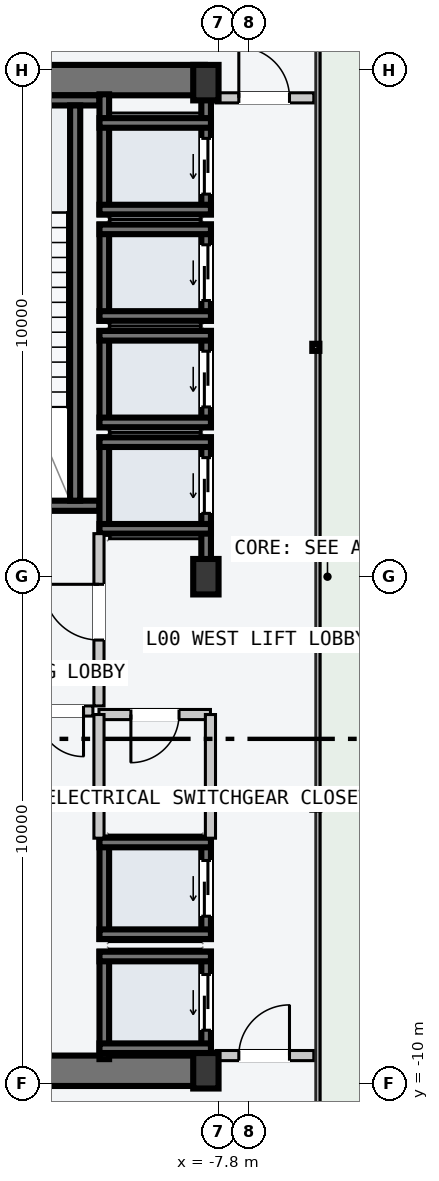
"""IFC4 building model, lengths in metres.
Left out: names, types, materials, properties, quantities, classifications, styles, units other than length and angle.
Written with IfcOpenShell. Run it as: python <this file> out.ifc"""

import sys

from ifc_helpers import new_model, si_unit, direction, frame, frame_2d, origin, origin_2d, place, context, subcontext, project, spatial, rectangle, i_section, extrude, element, fill, save


model = new_model("IFC4")
c1 = context("Model", 3, precision=1e-05, world=origin(), true_north=direction((0.0, 1.0)))
c2 = subcontext(c1, "Body", "Model", "MODEL_VIEW")
j1 = project(units=[si_unit("LENGTHUNIT", "METRE"), si_unit("PLANEANGLEUNIT", "RADIAN")], contexts=[c1])
p1 = place(None, origin())
s1 = spatial("IfcSite", under=j1, at=p1, CompositionType="ELEMENT")
p2 = place(p1, origin())
s2 = spatial("IfcBuilding", under=s1, at=p2, CompositionType="ELEMENT")
p3 = place(p2, origin())
s3 = spatial("IfcBuildingStorey", under=s2, at=p3, CompositionType="ELEMENT", Elevation=0.0)
for number, where, z_axis, x_axis in (
    (1, (-14.53, -9.75, -0.22), (0.0, 0.0, 1.0), (1.0, 0.0, 0.0)),
    (2, (-14.53, 9.8, -0.22), (0.0, 0.0, 1.0), (1.0, 0.0, 0.0)),
):
    element("IfcWall", number, at=place(p3, frame(where, z_axis=z_axis, x_axis=x_axis)), inside=s3, PredefinedType="SHEAR", context=c2, shape_type="SweptSolid", body=[
        extrude(rectangle(XDim=6.46, YDim=0.6, at=frame_2d((3.23, 0.0))), origin(), (0.0, 0.0, 1.0), 4.8),
    ])
p4 = place(p3, frame((-10.15, 1.4, -0.22), z_axis=(0.0, 0.0, 1.0), x_axis=(-1.0, 0.0, 0.0)))
e3 = element("IfcWall", 3, at=p4, inside=s3, PredefinedType="SOLIDWALL", context=c2, shape_type="SweptSolid", body=[
    extrude(rectangle(XDim=4.1, YDim=0.2, at=frame_2d((2.05, 0.0))), origin(), (0.0, 0.0, 1.0), 4.8),
])
p5 = place(p4, frame((1.5, 0.0, 0.22)))
e4 = element("IfcOpeningElement", 4, at=p5, cuts=e3, PredefinedType="OPENING", context=c2, shape_type="SweptSolid", body=[
    extrude(rectangle(XDim=1.12, YDim=2.18, at=frame_2d((0.56, 1.09))), frame((0.0, 0.11, 0.0), z_axis=(0.0, -1.0, 0.0), x_axis=(1.0, 0.0, 0.0)), (0.0, 0.0, 1.0), 0.22),
])
p6 = place(p3, frame((-14.25, 9.4, -0.22), z_axis=(0.0, 0.0, 1.0), x_axis=(1.0, 0.0, 0.0)))
e5 = element("IfcWall", 5, at=p6, inside=s3, PredefinedType="SOLIDWALL", context=c2, shape_type="SweptSolid", body=[
    extrude(rectangle(XDim=4.1, YDim=0.2, at=frame_2d((2.05, 0.0))), origin(), (0.0, 0.0, 1.0), 4.8),
])
p7 = place(p3, frame((-10.63, 1.5, -0.22), z_axis=(0.0, 0.0, 1.0), x_axis=(0.0, 1.0, 0.0)))
e6 = element("IfcWall", 6, at=p7, inside=s3, PredefinedType="SOLIDWALL", context=c2, shape_type="SweptSolid", body=[
    extrude(rectangle(XDim=7.8, YDim=0.2, at=frame_2d((3.9, 0.0))), origin(), (0.0, 0.0, 1.0), 4.8),
])
for number, where, z_axis, x_axis in (
    (7, (-8.05, -9.75, 0.0), (0.0, 0.0, 1.0), (1.0, 0.0, 0.0)),
    (8, (-8.05, 0.0, 0.0), (0.0, 0.0, 1.0), (1.0, 0.0, 0.0)),
    (9, (-8.05, 9.75, 0.0), (0.0, 0.0, 1.0), (1.0, 0.0, 0.0)),
):
    element("IfcColumn", number, at=place(p3, frame(where, z_axis=z_axis, x_axis=x_axis)), inside=s3, PredefinedType="COLUMN", context=c2, shape_type="SweptSolid", body=[
        extrude(i_section(OverallWidth=0.5, OverallDepth=0.7, WebThickness=0.028, FlangeThickness=0.045, at=origin_2d()), origin(), (0.0, 0.0, 1.0), 4.8),
    ])
p8 = place(p3, frame((-8.045, 0.21, -0.22), z_axis=(0.0, 0.0, 1.0), x_axis=(0.0, 1.0, 0.0)))
e10 = element("IfcWall", 10, at=p8, inside=s3, PredefinedType="SOLIDWALL", context=c2, shape_type="SweptSolid", body=[
    extrude(rectangle(XDim=2.54, YDim=0.19, at=frame_2d((1.27, 0.0))), origin(), (0.0, 0.0, 1.0), 4.8),
])
p9 = place(p8, frame((1.04, 0.0, 0.22)))
e11 = element("IfcOpeningElement", 11, at=p9, cuts=e10, PredefinedType="OPENING", context=c2, shape_type="SweptSolid", body=[
    extrude(rectangle(XDim=1.1, YDim=2.2, at=frame_2d((0.55, 1.1))), frame((0.0, 0.105, 0.0), z_axis=(0.0, -1.0, 0.0), x_axis=(1.0, 0.0, 0.0)), (0.0, 0.0, 1.0), 0.21),
])
p10 = place(p3, frame((-10.055, 0.85, -0.22), z_axis=(0.0, 0.0, 1.0), x_axis=(0.0, 1.0, 0.0)))
e12 = element("IfcWall", 12, at=p10, inside=s3, PredefinedType="SOLIDWALL", context=c2, shape_type="SweptSolid", body=[
    extrude(rectangle(XDim=1.9, YDim=0.19, at=frame_2d((0.95, 0.0))), origin(), (0.0, 0.0, 1.0), 4.8),
])
for number, where, z_axis, x_axis in (
    (13, (-10.15, 2.655, -0.22), (0.0, 0.0, 1.0), (1.0, 0.0, 0.0)),
    (14, (-10.15, 0.945, -0.22), (0.0, 0.0, 1.0), (1.0, 0.0, 0.0)),
):
    element("IfcWall", number, at=place(p3, frame(where, z_axis=z_axis, x_axis=x_axis)), inside=s3, PredefinedType="SOLIDWALL", context=c2, shape_type="SweptSolid", body=[
        extrude(rectangle(XDim=2.2, YDim=0.19, at=frame_2d((1.1, 0.0))), origin(), (0.0, 0.0, 1.0), 4.8),
    ])
p11 = place(p3, frame((-8.045, 2.95, -0.22), z_axis=(0.0, 0.0, 1.0), x_axis=(0.0, 1.0, 0.0)))
e15 = element("IfcWall", 15, at=p11, inside=s3, PredefinedType="SOLIDWALL", context=c2, shape_type="SweptSolid", body=[
    extrude(rectangle(XDim=1.9, YDim=0.19, at=frame_2d((0.95, 0.0))), origin(), (0.0, 0.0, 1.0), 4.8),
])
p12 = place(p11, frame((0.4, 0.0, 0.22)))
e16 = element("IfcOpeningElement", 16, at=p12, cuts=e15, PredefinedType="OPENING", context=c2, shape_type="SweptSolid", body=[
    extrude(rectangle(XDim=1.1, YDim=2.2, at=frame_2d((0.55, 1.1))), frame((0.0, 0.105, 0.0), z_axis=(0.0, -1.0, 0.0), x_axis=(1.0, 0.0, 0.0)), (0.0, 0.0, 1.0), 0.21),
])
p13 = place(p3, frame((-10.055, 2.95, -0.22), z_axis=(0.0, 0.0, 1.0), x_axis=(0.0, 1.0, 0.0)))
e17 = element("IfcWall", 17, at=p13, inside=s3, PredefinedType="SOLIDWALL", context=c2, shape_type="SweptSolid", body=[
    extrude(rectangle(XDim=1.9, YDim=0.19, at=frame_2d((0.95, 0.0))), origin(), (0.0, 0.0, 1.0), 4.8),
])
for number, where, z_axis, x_axis in (
    (18, (-10.15, 4.755, -0.22), (0.0, 0.0, 1.0), (1.0, 0.0, 0.0)),
    (19, (-10.15, 3.045, -0.22), (0.0, 0.0, 1.0), (1.0, 0.0, 0.0)),
):
    element("IfcWall", number, at=place(p3, frame(where, z_axis=z_axis, x_axis=x_axis)), inside=s3, PredefinedType="SOLIDWALL", context=c2, shape_type="SweptSolid", body=[
        extrude(rectangle(XDim=2.2, YDim=0.19, at=frame_2d((1.1, 0.0))), origin(), (0.0, 0.0, 1.0), 4.8),
    ])
p14 = place(p3, frame((-8.045, 5.05, -0.22), z_axis=(0.0, 0.0, 1.0), x_axis=(0.0, 1.0, 0.0)))
e20 = element("IfcWall", 20, at=p14, inside=s3, PredefinedType="SOLIDWALL", context=c2, shape_type="SweptSolid", body=[
    extrude(rectangle(XDim=1.9, YDim=0.19, at=frame_2d((0.95, 0.0))), origin(), (0.0, 0.0, 1.0), 4.8),
])
p15 = place(p14, frame((0.4, 0.0, 0.22)))
e21 = element("IfcOpeningElement", 21, at=p15, cuts=e20, PredefinedType="OPENING", context=c2, shape_type="SweptSolid", body=[
    extrude(rectangle(XDim=1.1, YDim=2.2, at=frame_2d((0.55, 1.1))), frame((0.0, 0.105, 0.0), z_axis=(0.0, -1.0, 0.0), x_axis=(1.0, 0.0, 0.0)), (0.0, 0.0, 1.0), 0.21),
])
p16 = place(p3, frame((-10.055, 5.05, -0.22), z_axis=(0.0, 0.0, 1.0), x_axis=(0.0, 1.0, 0.0)))
e22 = element("IfcWall", 22, at=p16, inside=s3, PredefinedType="SOLIDWALL", context=c2, shape_type="SweptSolid", body=[
    extrude(rectangle(XDim=1.9, YDim=0.19, at=frame_2d((0.95, 0.0))), origin(), (0.0, 0.0, 1.0), 4.8),
])
for number, where, z_axis, x_axis in (
    (23, (-10.15, 6.855, -0.22), (0.0, 0.0, 1.0), (1.0, 0.0, 0.0)),
    (24, (-10.15, 5.145, -0.22), (0.0, 0.0, 1.0), (1.0, 0.0, 0.0)),
):
    element("IfcWall", number, at=place(p3, frame(where, z_axis=z_axis, x_axis=x_axis)), inside=s3, PredefinedType="SOLIDWALL", context=c2, shape_type="SweptSolid", body=[
        extrude(rectangle(XDim=2.2, YDim=0.19, at=frame_2d((1.1, 0.0))), origin(), (0.0, 0.0, 1.0), 4.8),
    ])
p17 = place(p3, frame((-8.045, 7.15, -0.22), z_axis=(0.0, 0.0, 1.0), x_axis=(0.0, 1.0, 0.0)))
e25 = element("IfcWall", 25, at=p17, inside=s3, PredefinedType="SOLIDWALL", context=c2, shape_type="SweptSolid", body=[
    extrude(rectangle(XDim=2.37, YDim=0.19, at=frame_2d((1.185, 0.0))), origin(), (0.0, 0.0, 1.0), 4.8),
])
p18 = place(p17, frame((0.4, 0.0, 0.22)))
e26 = element("IfcOpeningElement", 26, at=p18, cuts=e25, PredefinedType="OPENING", context=c2, shape_type="SweptSolid", body=[
    extrude(rectangle(XDim=1.1, YDim=2.2, at=frame_2d((0.55, 1.1))), frame((0.0, 0.105, 0.0), z_axis=(0.0, -1.0, 0.0), x_axis=(1.0, 0.0, 0.0)), (0.0, 0.0, 1.0), 0.21),
])
p19 = place(p3, frame((-10.055, 7.15, -0.22), z_axis=(0.0, 0.0, 1.0), x_axis=(0.0, 1.0, 0.0)))
e27 = element("IfcWall", 27, at=p19, inside=s3, PredefinedType="SOLIDWALL", context=c2, shape_type="SweptSolid", body=[
    extrude(rectangle(XDim=2.37, YDim=0.19, at=frame_2d((1.185, 0.0))), origin(), (0.0, 0.0, 1.0), 4.8),
])
for number, where, z_axis, x_axis in (
    (28, (-10.15, 8.955, -0.22), (0.0, 0.0, 1.0), (1.0, 0.0, 0.0)),
    (29, (-10.15, 7.245, -0.22), (0.0, 0.0, 1.0), (1.0, 0.0, 0.0)),
):
    element("IfcWall", number, at=place(p3, frame(where, z_axis=z_axis, x_axis=x_axis)), inside=s3, PredefinedType="SOLIDWALL", context=c2, shape_type="SweptSolid", body=[
        extrude(rectangle(XDim=2.2, YDim=0.19, at=frame_2d((1.1, 0.0))), origin(), (0.0, 0.0, 1.0), 4.8),
    ])
p20 = place(p3, frame((-8.045, -9.52, -0.22), z_axis=(0.0, 0.0, 1.0), x_axis=(0.0, 1.0, 0.0)))
e30 = element("IfcWall", 30, at=p20, inside=s3, PredefinedType="SOLIDWALL", context=c2, shape_type="SweptSolid", body=[
    extrude(rectangle(XDim=2.12, YDim=0.19, at=frame_2d((1.06, 0.0))), origin(), (0.0, 0.0, 1.0), 4.8),
])
p21 = place(p20, frame((0.57, 0.0, 0.22)))
e31 = element("IfcOpeningElement", 31, at=p21, cuts=e30, PredefinedType="OPENING", context=c2, shape_type="SweptSolid", body=[
    extrude(rectangle(XDim=1.1, YDim=2.2, at=frame_2d((0.55, 1.1))), frame((0.0, 0.105, 0.0), z_axis=(0.0, -1.0, 0.0), x_axis=(1.0, 0.0, 0.0)), (0.0, 0.0, 1.0), 0.21),
])
p22 = place(p3, frame((-10.055, -9.52, -0.22), z_axis=(0.0, 0.0, 1.0), x_axis=(0.0, 1.0, 0.0)))
e32 = element("IfcWall", 32, at=p22, inside=s3, PredefinedType="SOLIDWALL", context=c2, shape_type="SweptSolid", body=[
    extrude(rectangle(XDim=2.12, YDim=0.19, at=frame_2d((1.06, 0.0))), origin(), (0.0, 0.0, 1.0), 4.8),
])
for number, where, z_axis, x_axis in (
    (33, (-10.15, -7.495, -0.22), (0.0, 0.0, 1.0), (1.0, 0.0, 0.0)),
    (34, (-10.15, -9.305, -0.22), (0.0, 0.0, 1.0), (1.0, 0.0, 0.0)),
):
    element("IfcWall", number, at=place(p3, frame(where, z_axis=z_axis, x_axis=x_axis)), inside=s3, PredefinedType="SOLIDWALL", context=c2, shape_type="SweptSolid", body=[
        extrude(rectangle(XDim=2.2, YDim=0.19, at=frame_2d((1.1, 0.0))), origin(), (0.0, 0.0, 1.0), 4.8),
    ])
p23 = place(p3, frame((-8.045, -7.15, -0.22), z_axis=(0.0, 0.0, 1.0), x_axis=(0.0, 1.0, 0.0)))
e35 = element("IfcWall", 35, at=p23, inside=s3, PredefinedType="SOLIDWALL", context=c2, shape_type="SweptSolid", body=[
    extrude(rectangle(XDim=2.0, YDim=0.19, at=frame_2d((1.0, 0.0))), origin(), (0.0, 0.0, 1.0), 4.8),
])
p24 = place(p23, frame((0.45, 0.0, 0.22)))
e36 = element("IfcOpeningElement", 36, at=p24, cuts=e35, PredefinedType="OPENING", context=c2, shape_type="SweptSolid", body=[
    extrude(rectangle(XDim=1.1, YDim=2.2, at=frame_2d((0.55, 1.1))), frame((0.0, 0.105, 0.0), z_axis=(0.0, -1.0, 0.0), x_axis=(1.0, 0.0, 0.0)), (0.0, 0.0, 1.0), 0.21),
])
p25 = place(p3, frame((-10.055, -7.15, -0.22), z_axis=(0.0, 0.0, 1.0), x_axis=(0.0, 1.0, 0.0)))
e37 = element("IfcWall", 37, at=p25, inside=s3, PredefinedType="SOLIDWALL", context=c2, shape_type="SweptSolid", body=[
    extrude(rectangle(XDim=2.0, YDim=0.19, at=frame_2d((1.0, 0.0))), origin(), (0.0, 0.0, 1.0), 4.8),
])
for number, where, z_axis, x_axis in (
    (38, (-10.15, -5.245, -0.22), (0.0, 0.0, 1.0), (1.0, 0.0, 0.0)),
    (39, (-10.15, -7.055, -0.22), (0.0, 0.0, 1.0), (1.0, 0.0, 0.0)),
):
    element("IfcWall", number, at=place(p3, frame(where, z_axis=z_axis, x_axis=x_axis)), inside=s3, PredefinedType="SOLIDWALL", context=c2, shape_type="SweptSolid", body=[
        extrude(rectangle(XDim=2.2, YDim=0.19, at=frame_2d((1.1, 0.0))), origin(), (0.0, 0.0, 1.0), 4.8),
    ])
p26 = place(p3, frame((-10.16, -2.55, 0.0), z_axis=(0.0, 0.0, 1.0), x_axis=(0.0, 1.0, 0.0)))
e40 = element("IfcWall", 40, at=p26, inside=s3, PredefinedType="PARTITIONING", context=c2, shape_type="SweptSolid", body=[
    extrude(rectangle(XDim=3.4, YDim=0.2, at=frame_2d((1.7, 0.0))), origin(), (0.0, 0.0, 1.0), 4.58),
])
p27 = place(p26, frame((1.3, 0.0, 0.0)))
e41 = element("IfcOpeningElement", 41, at=p27, cuts=e40, PredefinedType="OPENING", context=c2, shape_type="SweptSolid", body=[
    extrude(rectangle(XDim=1.1, YDim=2.15, at=frame_2d((0.55, 1.075))), frame((0.0, 0.11, 0.0), z_axis=(0.0, -1.0, 0.0), x_axis=(1.0, 0.0, 0.0)), (0.0, 0.0, 1.0), 0.22),
])
p28 = place(p3, frame((-10.28, -2.65, 0.0), z_axis=(0.0, 0.0, 1.0), x_axis=(-1.0, 0.0, 0.0)))
e42 = element("IfcWall", 42, at=p28, inside=s3, PredefinedType="PARTITIONING", context=c2, shape_type="SweptSolid", body=[
    extrude(rectangle(XDim=1.27, YDim=0.2, at=frame_2d((0.635, 0.0))), origin(), (0.0, 0.0, 1.0), 4.58),
])
p29 = place(p28, frame((0.185, 0.0, 0.0)))
e43 = element("IfcOpeningElement", 43, at=p29, cuts=e42, PredefinedType="OPENING", context=c2, shape_type="SweptSolid", body=[
    extrude(rectangle(XDim=0.9, YDim=2.15, at=frame_2d((0.45, 1.075))), frame((0.0, 0.11, 0.0), z_axis=(0.0, -1.0, 0.0), x_axis=(1.0, 0.0, 0.0)), (0.0, 0.0, 1.0), 0.22),
])
p30 = place(p3, frame((-7.96, -2.72, 0.0), z_axis=(0.0, 0.0, 1.0), x_axis=(-1.0, 0.0, 0.0)))
e44 = element("IfcWall", 44, at=p30, inside=s3, PredefinedType="PARTITIONING", context=c2, shape_type="SweptSolid", body=[
    extrude(rectangle(XDim=2.2, YDim=0.2, at=frame_2d((1.1, 0.0))), origin(), (0.0, 0.0, 1.0), 4.58),
])
p31 = place(p30, frame((0.62, 0.0, 0.0)))
e45 = element("IfcOpeningElement", 45, at=p31, cuts=e44, PredefinedType="OPENING", context=c2, shape_type="SweptSolid", body=[
    extrude(rectangle(XDim=0.95, YDim=2.1, at=frame_2d((0.475, 1.05))), frame((0.0, 0.11, 0.0), z_axis=(0.0, -1.0, 0.0), x_axis=(1.0, 0.0, 0.0)), (0.0, 0.0, 1.0), 0.22),
])
for number, where, z_axis, x_axis in (
    (46, (-7.96, -5.16, 0.0), (0.0, 0.0, 1.0), (0.0, 1.0, 0.0)),
    (47, (-10.16, -5.16, 0.0), (0.0, 0.0, 1.0), (0.0, 1.0, 0.0)),
):
    element("IfcWall", number, at=place(p3, frame(where, z_axis=z_axis, x_axis=x_axis)), inside=s3, PredefinedType="PARTITIONING", context=c2, shape_type="SweptSolid", body=[
        extrude(rectangle(XDim=2.44, YDim=0.2, at=frame_2d((1.22, 0.0))), origin(), (0.0, 0.0, 1.0), 4.58),
    ])
p32 = place(p3, frame((-7.85, -9.45, 0.0), z_axis=(0.0, 0.0, 1.0), x_axis=(1.0, 0.0, 0.0)))
e48 = element("IfcWall", 48, at=p32, inside=s3, PredefinedType="PARTITIONING", context=c2, shape_type="SweptSolid", body=[
    extrude(rectangle(XDim=1.93, YDim=0.2, at=frame_2d((0.965, 0.0))), origin(), (0.0, 0.0, 1.0), 4.58),
])
p33 = place(p32, frame((0.45, 0.0, 0.0)))
e49 = element("IfcOpeningElement", 49, at=p33, cuts=e48, PredefinedType="OPENING", context=c2, shape_type="SweptSolid", body=[
    extrude(rectangle(XDim=1.0, YDim=2.15, at=frame_2d((0.5, 1.075))), frame((0.0, 0.11, 0.0), z_axis=(0.0, -1.0, 0.0), x_axis=(1.0, 0.0, 0.0)), (0.0, 0.0, 1.0), 0.22),
])
p34 = place(p3, frame((-7.85, 9.45, 0.0), z_axis=(0.0, 0.0, 1.0), x_axis=(1.0, 0.0, 0.0)))
e50 = element("IfcWall", 50, at=p34, inside=s3, PredefinedType="PARTITIONING", context=c2, shape_type="SweptSolid", body=[
    extrude(rectangle(XDim=1.93, YDim=0.2, at=frame_2d((0.965, 0.0))), origin(), (0.0, 0.0, 1.0), 4.58),
])
p35 = place(p34, frame((0.45, 0.0, 0.0)))
e51 = element("IfcOpeningElement", 51, at=p35, cuts=e50, PredefinedType="OPENING", context=c2, shape_type="SweptSolid", body=[
    extrude(rectangle(XDim=1.0, YDim=2.15, at=frame_2d((0.5, 1.075))), frame((0.0, 0.11, 0.0), z_axis=(0.0, -1.0, 0.0), x_axis=(1.0, 0.0, 0.0)), (0.0, 0.0, 1.0), 0.22),
])
p36 = place(p9, origin())
e52 = element("IfcDoor", 52, at=p36, inside=s3, OperationType="SLIDING_TO_LEFT", PredefinedType="DOOR", context=c2, shape_type="SweptSolid", body=[
    extrude(rectangle(XDim=1.1, YDim=2.2, at=frame_2d((0.55, 1.1))), frame((0.0, 0.025, 0.0), z_axis=(0.0, -1.0, 0.0), x_axis=(1.0, 0.0, 0.0)), (0.0, 0.0, 1.0), 0.05),
])
fill(e11, e52)
p37 = place(p12, origin())
e53 = element("IfcDoor", 53, at=p37, inside=s3, OperationType="SLIDING_TO_LEFT", PredefinedType="DOOR", context=c2, shape_type="SweptSolid", body=[
    extrude(rectangle(XDim=1.1, YDim=2.2, at=frame_2d((0.55, 1.1))), frame((0.0, 0.025, 0.0), z_axis=(0.0, -1.0, 0.0), x_axis=(1.0, 0.0, 0.0)), (0.0, 0.0, 1.0), 0.05),
])
fill(e16, e53)
p38 = place(p15, origin())
e54 = element("IfcDoor", 54, at=p38, inside=s3, OperationType="SLIDING_TO_LEFT", PredefinedType="DOOR", context=c2, shape_type="SweptSolid", body=[
    extrude(rectangle(XDim=1.1, YDim=2.2, at=frame_2d((0.55, 1.1))), frame((0.0, 0.025, 0.0), z_axis=(0.0, -1.0, 0.0), x_axis=(1.0, 0.0, 0.0)), (0.0, 0.0, 1.0), 0.05),
])
fill(e21, e54)
p39 = place(p18, origin())
e55 = element("IfcDoor", 55, at=p39, inside=s3, OperationType="SLIDING_TO_LEFT", PredefinedType="DOOR", context=c2, shape_type="SweptSolid", body=[
    extrude(rectangle(XDim=1.1, YDim=2.2, at=frame_2d((0.55, 1.1))), frame((0.0, 0.025, 0.0), z_axis=(0.0, -1.0, 0.0), x_axis=(1.0, 0.0, 0.0)), (0.0, 0.0, 1.0), 0.05),
])
fill(e26, e55)
p40 = place(p21, origin())
e56 = element("IfcDoor", 56, at=p40, inside=s3, OperationType="SLIDING_TO_LEFT", PredefinedType="DOOR", context=c2, shape_type="SweptSolid", body=[
    extrude(rectangle(XDim=1.1, YDim=2.2, at=frame_2d((0.55, 1.1))), frame((0.0, 0.025, 0.0), z_axis=(0.0, -1.0, 0.0), x_axis=(1.0, 0.0, 0.0)), (0.0, 0.0, 1.0), 0.05),
])
fill(e31, e56)
p41 = place(p24, origin())
e57 = element("IfcDoor", 57, at=p41, inside=s3, OperationType="SLIDING_TO_LEFT", PredefinedType="DOOR", context=c2, shape_type="SweptSolid", body=[
    extrude(rectangle(XDim=1.1, YDim=2.2, at=frame_2d((0.55, 1.1))), frame((0.0, 0.025, 0.0), z_axis=(0.0, -1.0, 0.0), x_axis=(1.0, 0.0, 0.0)), (0.0, 0.0, 1.0), 0.05),
])
fill(e36, e57)
p42 = place(p27, origin())
e58 = element("IfcDoor", 58, at=p42, inside=s3, OperationType="SINGLE_SWING_RIGHT", PredefinedType="DOOR", context=c2, shape_type="SweptSolid", body=[
    extrude(rectangle(XDim=1.1, YDim=2.15, at=frame_2d((0.55, 1.075))), frame((0.0, 0.025, 0.0), z_axis=(0.0, -1.0, 0.0), x_axis=(1.0, 0.0, 0.0)), (0.0, 0.0, 1.0), 0.05),
])
fill(e41, e58)
p43 = place(p29, origin())
e59 = element("IfcDoor", 59, at=p43, inside=s3, OperationType="SINGLE_SWING_LEFT", PredefinedType="DOOR", context=c2, shape_type="SweptSolid", body=[
    extrude(rectangle(XDim=0.9, YDim=2.15, at=frame_2d((0.45, 1.075))), frame((0.0, 0.025, 0.0), z_axis=(0.0, -1.0, 0.0), x_axis=(1.0, 0.0, 0.0)), (0.0, 0.0, 1.0), 0.05),
])
fill(e43, e59)
p44 = place(p31, origin())
e60 = element("IfcDoor", 60, at=p44, inside=s3, OperationType="SINGLE_SWING_RIGHT", PredefinedType="DOOR", context=c2, shape_type="SweptSolid", body=[
    extrude(rectangle(XDim=0.95, YDim=2.1, at=frame_2d((0.475, 1.05))), frame((0.0, 0.025, 0.0), z_axis=(0.0, -1.0, 0.0), x_axis=(1.0, 0.0, 0.0)), (0.0, 0.0, 1.0), 0.05),
])
fill(e45, e60)
p45 = place(p33, origin())
e61 = element("IfcDoor", 61, at=p45, inside=s3, OperationType="SINGLE_SWING_RIGHT", PredefinedType="DOOR", context=c2, shape_type="SweptSolid", body=[
    extrude(rectangle(XDim=1.0, YDim=2.15, at=frame_2d((0.5, 1.075))), frame((0.0, 0.025, 0.0), z_axis=(0.0, -1.0, 0.0), x_axis=(1.0, 0.0, 0.0)), (0.0, 0.0, 1.0), 0.05),
])
fill(e49, e61)
p46 = place(p35, origin())
e62 = element("IfcDoor", 62, at=p46, inside=s3, OperationType="SINGLE_SWING_LEFT", PredefinedType="DOOR", context=c2, shape_type="SweptSolid", body=[
    extrude(rectangle(XDim=1.0, YDim=2.15, at=frame_2d((0.5, 1.075))), frame((0.0, 0.025, 0.0), z_axis=(0.0, -1.0, 0.0), x_axis=(1.0, 0.0, 0.0)), (0.0, 0.0, 1.0), 0.05),
])
fill(e51, e62)
save(model, sys.argv[1])
